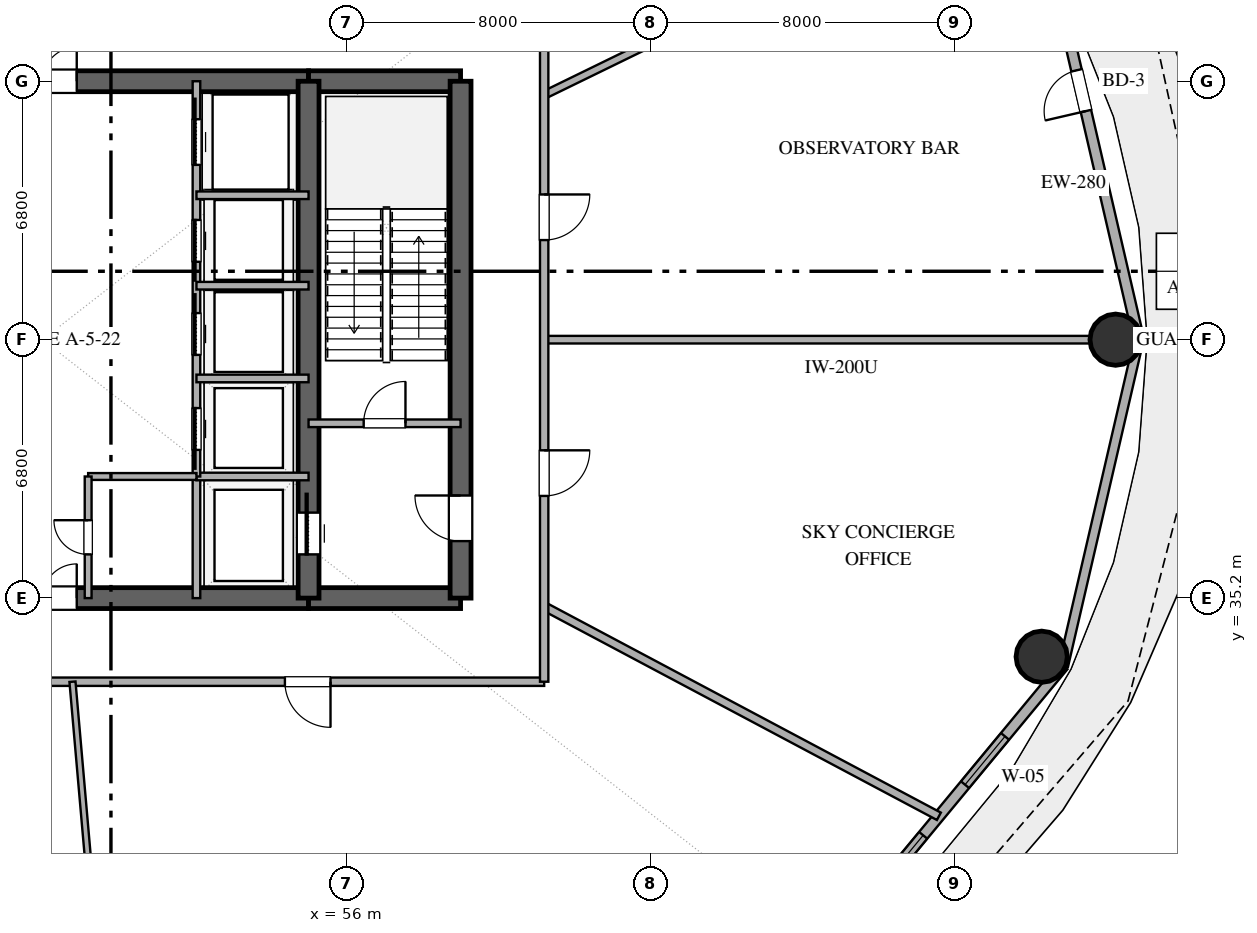
"""IFC4 building model, lengths in metres.
Left out: names, types, materials, properties, quantities, classifications, styles, units other than length and angle.
Written with IfcOpenShell. Run it as: python <this file> out.ifc"""

import sys

from ifc_helpers import new_model, si_unit, direction, frame, frame_2d, origin, origin_2d, place, context, subcontext, project, spatial, rectangle, hollow_circle, extrude, element, fill, save


model = new_model("IFC4")
c1 = context("Model", 3, precision=1e-05, world=origin(), true_north=direction((0.0, 1.0)))
c2 = subcontext(c1, "Body", "Model", "MODEL_VIEW")
j1 = project(units=[si_unit("LENGTHUNIT", "METRE"), si_unit("PLANEANGLEUNIT", "RADIAN")], contexts=[c1])
p1 = place(None, origin())
s1 = spatial("IfcSite", under=j1, at=p1, CompositionType="ELEMENT")
p2 = place(p1, origin())
s2 = spatial("IfcBuilding", under=s1, at=p2, CompositionType="ELEMENT")
p3 = place(p2, frame((0.0, 0.0, 134.4)))
s3 = spatial("IfcBuildingStorey", under=s2, at=p3, CompositionType="ELEMENT", Elevation=134.4)
p4 = place(p3, frame((41.0, 35.2, 0.0), z_axis=(0.0, 0.0, 1.0), x_axis=(1.0, 0.0, 0.0)))
e1 = element("IfcWall", 1, at=p4, inside=s3, PredefinedType="SHEAR", context=c2, shape_type="SweptSolid", body=[
    extrude(rectangle(XDim=14.0, YDim=0.55, at=frame_2d((7.0, 0.0))), origin(), (0.0, 0.0, 1.0), 5.05),
])
p5 = place(p4, frame((6.1, 0.0, 0.0)))
e2 = element("IfcOpeningElement", 2, at=p5, cuts=e1, PredefinedType="OPENING", context=c2, shape_type="SweptSolid", body=[
    extrude(rectangle(XDim=1.8, YDim=2.25, at=frame_2d((0.9, 1.125))), frame((0.0, 0.285, 0.0), z_axis=(0.0, -1.0, 0.0), x_axis=(1.0, 0.0, 0.0)), (0.0, 0.0, 1.0), 0.57),
])
p6 = place(p3, frame((55.0, 35.2, 0.0), z_axis=(0.0, 0.0, 1.0), x_axis=(1.0, 0.0, 0.0)))
e3 = element("IfcWall", 3, at=p6, inside=s3, PredefinedType="SHEAR", context=c2, shape_type="SweptSolid", body=[
    extrude(rectangle(XDim=4.0, YDim=0.55, at=frame_2d((2.0, 0.0))), origin(), (0.0, 0.0, 1.0), 5.05),
])
p7 = place(p3, frame((41.0, 48.8, 0.0), z_axis=(0.0, 0.0, 1.0), x_axis=(1.0, 0.0, 0.0)))
e4 = element("IfcWall", 4, at=p7, inside=s3, PredefinedType="SHEAR", context=c2, shape_type="SweptSolid", body=[
    extrude(rectangle(XDim=14.0, YDim=0.55, at=frame_2d((7.0, 0.0))), origin(), (0.0, 0.0, 1.0), 5.05),
])
p8 = place(p7, frame((6.1, 0.0, 0.0)))
e5 = element("IfcOpeningElement", 5, at=p8, cuts=e4, PredefinedType="OPENING", context=c2, shape_type="SweptSolid", body=[
    extrude(rectangle(XDim=1.8, YDim=2.25, at=frame_2d((0.9, 1.125))), frame((0.0, 0.285, 0.0), z_axis=(0.0, -1.0, 0.0), x_axis=(1.0, 0.0, 0.0)), (0.0, 0.0, 1.0), 0.57),
])
p9 = place(p3, frame((55.0, 48.8, 0.0), z_axis=(0.0, 0.0, 1.0), x_axis=(1.0, 0.0, 0.0)))
e6 = element("IfcWall", 6, at=p9, inside=s3, PredefinedType="SHEAR", context=c2, shape_type="SweptSolid", body=[
    extrude(rectangle(XDim=4.0, YDim=0.55, at=frame_2d((2.0, 0.0))), origin(), (0.0, 0.0, 1.0), 5.05),
])
p10 = place(p3, frame((59.0, 35.2, 0.0), z_axis=(0.0, 0.0, 1.0), x_axis=(0.0, 1.0, 0.0)))
e7 = element("IfcWall", 7, at=p10, inside=s3, PredefinedType="SHEAR", context=c2, shape_type="SweptSolid", body=[
    extrude(rectangle(XDim=13.6, YDim=0.55, at=frame_2d((6.8, 0.0))), origin(), (0.0, 0.0, 1.0), 5.05),
])
p11 = place(p10, frame((1.5, 0.0, 0.0)))
e8 = element("IfcOpeningElement", 8, at=p11, cuts=e7, PredefinedType="OPENING", context=c2, shape_type="SweptSolid", body=[
    extrude(rectangle(XDim=1.2, YDim=2.15, at=frame_2d((0.6, 1.075))), frame((0.0, 0.285, 0.0), z_axis=(0.0, -1.0, 0.0), x_axis=(1.0, 0.0, 0.0)), (0.0, 0.0, 1.0), 0.57),
])
p12 = place(p3, frame((55.0, 35.2, 0.0), z_axis=(0.0, 0.0, 1.0), x_axis=(0.0, 1.0, 0.0)))
e9 = element("IfcWall", 9, at=p12, inside=s3, PredefinedType="SHEAR", context=c2, shape_type="SweptSolid", body=[
    extrude(rectangle(XDim=13.6, YDim=0.55, at=frame_2d((6.8, 0.0))), origin(), (0.0, 0.0, 1.0), 5.05),
])
p13 = place(p12, frame((1.15, 0.0, 0.0)))
e10 = element("IfcOpeningElement", 10, at=p13, cuts=e9, PredefinedType="OPENING", context=c2, shape_type="SweptSolid", body=[
    extrude(rectangle(XDim=1.1, YDim=2.2, at=frame_2d((0.55, 1.1))), frame((0.0, 0.285, 0.0), z_axis=(0.0, -1.0, 0.0), x_axis=(1.0, 0.0, 0.0)), (0.0, 0.0, 1.0), 0.57),
])
for number, where, z_axis, x_axis in (
    (11, (76.237, 42.0, 0.0), (0.0, 0.0, 1.0), (1.0, 0.0, 0.0)),
    (12, (74.291, 33.657, 0.0), (0.0, 0.0, 1.0), (1.0, 0.0, 0.0)),
):
    element("IfcColumn", number, at=place(p3, frame(where, z_axis=z_axis, x_axis=x_axis)), inside=s3, PredefinedType="COLUMN", context=c2, shape_type="SweptSolid", body=[
        extrude(hollow_circle(Radius=0.675, WallThickness=0.036, at=origin_2d()), origin(), (0.0, 0.0, 1.0), 5.05),
    ])
p14 = place(p3, frame((76.849, 42.0, 0.0), z_axis=(0.0, 0.0, 1.0), x_axis=(-0.22558597182, 0.974223264616, 0.0)))
e13 = element("IfcWall", 13, at=p14, inside=s3, PredefinedType="SOLIDWALL", context=c2, shape_type="SweptSolid", body=[
    extrude(rectangle(XDim=8.811, YDim=0.28, at=frame_2d((4.405, 0.0))), origin(), (0.0, 0.0, 1.0), 5.05),
])
p15 = place(p14, frame((6.175, 0.0, 0.0)))
e14 = element("IfcOpeningElement", 14, at=p15, cuts=e13, PredefinedType="OPENING", context=c2, shape_type="SweptSolid", body=[
    extrude(rectangle(XDim=1.1, YDim=2.25, at=frame_2d((0.55, 1.125))), frame((0.0, 0.15, 0.0), z_axis=(0.0, -1.0, 0.0), x_axis=(1.0, 0.0, 0.0)), (0.0, 0.0, 1.0), 0.3),
])
p16 = place(p3, frame((68.84, 26.14, 0.0), z_axis=(0.0, 0.0, 1.0), x_axis=(0.637505817448, 0.770445541696, 0.0)))
e15 = element("IfcWall", 15, at=p16, inside=s3, PredefinedType="SOLIDWALL", context=c2, shape_type="SweptSolid", body=[
    extrude(rectangle(XDim=9.445, YDim=0.28, at=frame_2d((4.723, 0.0))), origin(), (0.0, 0.0, 1.0), 5.05),
])
p17 = place(p16, frame((1.86, 0.0, 0.85)))
e16 = element("IfcOpeningElement", 16, at=p17, cuts=e15, PredefinedType="OPENING", context=c2, shape_type="SweptSolid", body=[
    extrude(rectangle(XDim=1.8, YDim=2.2, at=frame_2d((0.9, 1.1))), frame((0.0, 0.15, 0.0), z_axis=(0.0, -1.0, 0.0), x_axis=(1.0, 0.0, 0.0)), (0.0, 0.0, 1.0), 0.3),
])
p18 = place(p16, frame((5.388, 0.0, 0.85)))
e17 = element("IfcOpeningElement", 17, at=p18, cuts=e15, PredefinedType="OPENING", context=c2, shape_type="SweptSolid", body=[
    extrude(rectangle(XDim=1.65, YDim=2.0, at=frame_2d((0.825, 1.0))), frame((0.0, 0.15, 0.0), z_axis=(0.0, -1.0, 0.0), x_axis=(1.0, 0.0, 0.0)), (0.0, 0.0, 1.0), 0.3),
])
p19 = place(p3, frame((74.861, 33.417, 0.0), z_axis=(0.0, 0.0, 1.0), x_axis=(0.22558597182, 0.974223264616, 0.0)))
e18 = element("IfcWall", 18, at=p19, inside=s3, PredefinedType="SOLIDWALL", context=c2, shape_type="SweptSolid", body=[
    extrude(rectangle(XDim=8.811, YDim=0.25, at=frame_2d((4.405, 0.0))), origin(), (0.0, 0.0, 1.0), 5.05),
])
p20 = place(p3, frame((55.0, 39.8, 0.0), z_axis=(0.0, 0.0, 1.0), x_axis=(1.0, 0.0, 0.0)))
e19 = element("IfcWall", 19, at=p20, inside=s3, PredefinedType="SOLIDWALL", context=c2, shape_type="SweptSolid", body=[
    extrude(rectangle(XDim=4.0, YDim=0.2, at=frame_2d((2.0, 0.0))), origin(), (0.0, 0.0, 1.0), 4.35),
])
p21 = place(p20, frame((1.45, 0.0, 0.0)))
e20 = element("IfcOpeningElement", 20, at=p21, cuts=e19, PredefinedType="OPENING", context=c2, shape_type="SweptSolid", body=[
    extrude(rectangle(XDim=1.1, YDim=2.15, at=frame_2d((0.55, 1.075))), frame((0.0, 0.11, 0.0), z_axis=(0.0, -1.0, 0.0), x_axis=(1.0, 0.0, 0.0)), (0.0, 0.0, 1.0), 0.22),
])
p22 = place(p3, frame((52.05, 35.2, 0.0), z_axis=(0.0, 0.0, 1.0), x_axis=(0.0, 1.0, 0.0)))
e21 = element("IfcWall", 21, at=p22, inside=s3, PredefinedType="SOLIDWALL", context=c2, shape_type="SweptSolid", body=[
    extrude(rectangle(XDim=3.2, YDim=0.2, at=frame_2d((1.6, 0.0))), origin(), (0.0, 0.0, 1.0), 4.35),
])
p23 = place(p3, frame((52.05, 38.4, 0.0), z_axis=(0.0, 0.0, 1.0), x_axis=(1.0, 0.0, 0.0)))
e22 = element("IfcWall", 22, at=p23, inside=s3, PredefinedType="SOLIDWALL", context=c2, shape_type="SweptSolid", body=[
    extrude(rectangle(XDim=2.95, YDim=0.2, at=frame_2d((1.475, 0.0))), origin(), (0.0, 0.0, 1.0), 4.35),
])
p24 = place(p3, frame((52.05, 38.4, 0.0), z_axis=(0.0, 0.0, 1.0), x_axis=(0.0, 1.0, 0.0)))
e23 = element("IfcWall", 23, at=p24, inside=s3, PredefinedType="SOLIDWALL", context=c2, shape_type="SweptSolid", body=[
    extrude(rectangle(XDim=10.4, YDim=0.2, at=frame_2d((5.2, 0.0))), origin(), (0.0, 0.0, 1.0), 4.35),
])
p25 = place(p24, frame((0.7, 0.0, 0.0)))
e24 = element("IfcOpeningElement", 24, at=p25, cuts=e23, PredefinedType="OPENING", context=c2, shape_type="SweptSolid", body=[
    extrude(rectangle(XDim=1.1, YDim=2.2, at=frame_2d((0.55, 1.1))), frame((0.0, 0.11, 0.0), z_axis=(0.0, -1.0, 0.0), x_axis=(1.0, 0.0, 0.0)), (0.0, 0.0, 1.0), 0.22),
])
p26 = place(p24, frame((3.2, 0.0, 0.0)))
e25 = element("IfcOpeningElement", 25, at=p26, cuts=e23, PredefinedType="OPENING", context=c2, shape_type="SweptSolid", body=[
    extrude(rectangle(XDim=1.1, YDim=2.2, at=frame_2d((0.55, 1.1))), frame((0.0, 0.11, 0.0), z_axis=(0.0, -1.0, 0.0), x_axis=(1.0, 0.0, 0.0)), (0.0, 0.0, 1.0), 0.22),
])
p27 = place(p24, frame((5.65, 0.0, 0.0)))
e26 = element("IfcOpeningElement", 26, at=p27, cuts=e23, PredefinedType="OPENING", context=c2, shape_type="SweptSolid", body=[
    extrude(rectangle(XDim=1.1, YDim=2.2, at=frame_2d((0.55, 1.1))), frame((0.0, 0.11, 0.0), z_axis=(0.0, -1.0, 0.0), x_axis=(1.0, 0.0, 0.0)), (0.0, 0.0, 1.0), 0.22),
])
p28 = place(p24, frame((8.2, 0.0, 0.0)))
e27 = element("IfcOpeningElement", 27, at=p28, cuts=e23, PredefinedType="OPENING", context=c2, shape_type="SweptSolid", body=[
    extrude(rectangle(XDim=1.2, YDim=2.2, at=frame_2d((0.6, 1.1))), frame((0.0, 0.11, 0.0), z_axis=(0.0, -1.0, 0.0), x_axis=(1.0, 0.0, 0.0)), (0.0, 0.0, 1.0), 0.22),
])
for number, where, z_axis, x_axis in (
    (28, (52.05, 40.98, 0.0), (0.0, 0.0, 1.0), (1.0, 0.0, 0.0)),
    (29, (52.05, 43.42, 0.0), (0.0, 0.0, 1.0), (1.0, 0.0, 0.0)),
    (30, (52.05, 45.8, 0.0), (0.0, 0.0, 1.0), (1.0, 0.0, 0.0)),
):
    element("IfcWall", number, at=place(p3, frame(where, z_axis=z_axis, x_axis=x_axis)), inside=s3, PredefinedType="SOLIDWALL", context=c2, shape_type="SweptSolid", body=[
        extrude(rectangle(XDim=2.95, YDim=0.2, at=frame_2d((1.475, 0.0))), origin(), (0.0, 0.0, 1.0), 4.35),
    ])
p29 = place(p3, frame((49.2, 38.4, 0.0), z_axis=(0.0, 0.0, 1.0), x_axis=(1.0, 0.0, 0.0)))
e31 = element("IfcWall", 31, at=p29, inside=s3, PredefinedType="PLUMBINGWALL", context=c2, shape_type="SweptSolid", body=[
    extrude(rectangle(XDim=2.85, YDim=0.18, at=frame_2d((1.425, 0.0))), origin(), (0.0, 0.0, 1.0), 4.35),
])
p30 = place(p3, frame((49.2, 35.2, 0.0), z_axis=(0.0, 0.0, 1.0), x_axis=(0.0, 1.0, 0.0)))
e32 = element("IfcWall", 32, at=p30, inside=s3, PredefinedType="PLUMBINGWALL", context=c2, shape_type="SweptSolid", body=[
    extrude(rectangle(XDim=3.2, YDim=0.18, at=frame_2d((1.6, 0.0))), origin(), (0.0, 0.0, 1.0), 4.35),
])
p31 = place(p30, frame((1.15, 0.0, 0.0)))
e33 = element("IfcOpeningElement", 33, at=p31, cuts=e32, PredefinedType="OPENING", context=c2, shape_type="SweptSolid", body=[
    extrude(rectangle(XDim=0.9, YDim=2.1, at=frame_2d((0.45, 1.05))), frame((0.0, 0.1, 0.0), z_axis=(0.0, -1.0, 0.0), x_axis=(1.0, 0.0, 0.0)), (0.0, 0.0, 1.0), 0.2),
])
p32 = place(p3, frame((76.849, 42.0, 0.0), z_axis=(0.0, 0.0, 1.0), x_axis=(-1.0, 0.0, 0.0)))
e34 = element("IfcWall", 34, at=p32, inside=s3, PredefinedType="PARTITIONING", context=c2, shape_type="SweptSolid", body=[
    extrude(rectangle(XDim=15.649, YDim=0.2, at=frame_2d((7.825, 0.0))), origin(), (0.0, 0.0, 1.0), 4.35),
])
p33 = place(p3, frame((61.2, 33.0, 0.0), z_axis=(0.0, 0.0, 1.0), x_axis=(-1.0, 0.0, 0.0)))
e35 = element("IfcWall", 35, at=p33, inside=s3, PredefinedType="SOLIDWALL", context=c2, shape_type="SweptSolid", body=[
    extrude(rectangle(XDim=26.4, YDim=0.22, at=frame_2d((13.2, 0.0))), origin(), (0.0, 0.0, 1.0), 4.35),
])
p34 = place(p33, frame((18.645, 0.0, 0.0)))
e36 = element("IfcOpeningElement", 36, at=p34, cuts=e35, PredefinedType="OPENING", context=c2, shape_type="SweptSolid", body=[
    extrude(rectangle(XDim=1.2, YDim=2.25, at=frame_2d((0.6, 1.125))), frame((0.0, 0.12, 0.0), z_axis=(0.0, -1.0, 0.0), x_axis=(1.0, 0.0, 0.0)), (0.0, 0.0, 1.0), 0.24),
])
p35 = place(p33, frame((5.622, 0.0, 0.0)))
e37 = element("IfcOpeningElement", 37, at=p35, cuts=e35, PredefinedType="OPENING", context=c2, shape_type="SweptSolid", body=[
    extrude(rectangle(XDim=1.2, YDim=2.25, at=frame_2d((0.6, 1.125))), frame((0.0, 0.12, 0.0), z_axis=(0.0, -1.0, 0.0), x_axis=(1.0, 0.0, 0.0)), (0.0, 0.0, 1.0), 0.24),
])
p36 = place(p3, frame((49.937, 19.861, 0.0), z_axis=(0.0, 0.0, 1.0), x_axis=(-0.087168787326, 0.996193556753, 0.0)))
e38 = element("IfcWall", 38, at=p36, inside=s3, PredefinedType="PLUMBINGWALL", context=c2, shape_type="SweptSolid", body=[
    extrude(rectangle(XDim=13.189, YDim=0.16, at=frame_2d((6.594, 0.0))), origin(), (0.0, 0.0, 1.0), 4.35),
])
p37 = place(p3, frame((72.198, 53.802, 0.0), z_axis=(0.0, 0.0, 1.0), x_axis=(-0.898789153873, -0.438381177608, 0.0)))
e39 = element("IfcWall", 39, at=p37, inside=s3, PredefinedType="PARTITIONING", context=c2, shape_type="SweptSolid", body=[
    extrude(rectangle(XDim=12.237, YDim=0.2, at=frame_2d((6.118, 0.0))), origin(), (0.0, 0.0, 1.0), 4.35),
])
p38 = place(p3, frame((61.2, 34.981, 0.0), z_axis=(0.0, 0.0, 1.0), x_axis=(0.88294798911, -0.469470817545, 0.0)))
e40 = element("IfcWall", 40, at=p38, inside=s3, PredefinedType="SOLIDWALL", context=c2, shape_type="SweptSolid", body=[
    extrude(rectangle(XDim=11.764, YDim=0.22, at=frame_2d((5.882, 0.0))), origin(), (0.0, 0.0, 1.0), 4.35),
])
p39 = place(p3, frame((61.2, 51.0, 0.0), z_axis=(0.0, 0.0, 1.0), x_axis=(0.0, -1.0, 0.0)))
e41 = element("IfcWall", 41, at=p39, inside=s3, PredefinedType="SOLIDWALL", context=c2, shape_type="SweptSolid", body=[
    extrude(rectangle(XDim=18.0, YDim=0.22, at=frame_2d((9.0, 0.0))), origin(), (0.0, 0.0, 1.0), 4.35),
])
p40 = place(p39, frame((11.911, 0.0, 0.0)))
e42 = element("IfcOpeningElement", 42, at=p40, cuts=e41, PredefinedType="OPENING", context=c2, shape_type="SweptSolid", body=[
    extrude(rectangle(XDim=1.2, YDim=2.25, at=frame_2d((0.6, 1.125))), frame((0.0, 0.12, 0.0), z_axis=(0.0, -1.0, 0.0), x_axis=(1.0, 0.0, 0.0)), (0.0, 0.0, 1.0), 0.24),
])
p41 = place(p39, frame((5.179, 0.0, 0.0)))
e43 = element("IfcOpeningElement", 43, at=p41, cuts=e41, PredefinedType="OPENING", context=c2, shape_type="SweptSolid", body=[
    extrude(rectangle(XDim=1.2, YDim=2.25, at=frame_2d((0.6, 1.125))), frame((0.0, 0.12, 0.0), z_axis=(0.0, -1.0, 0.0), x_axis=(1.0, 0.0, 0.0)), (0.0, 0.0, 1.0), 0.24),
])
p42 = place(p15, origin())
e44 = element("IfcDoor", 44, at=p42, inside=s3, OperationType="SINGLE_SWING_LEFT", PredefinedType="DOOR", context=c2, shape_type="SweptSolid", body=[
    extrude(rectangle(XDim=1.1, YDim=2.25, at=frame_2d((0.55, 1.125))), frame((0.0, 0.025, 0.0), z_axis=(0.0, -1.0, 0.0), x_axis=(1.0, 0.0, 0.0)), (0.0, 0.0, 1.0), 0.05),
])
fill(e14, e44)
p43 = place(p17, origin())
e45 = element("IfcWindow", 45, at=p43, inside=s3, PartitioningType="SINGLE_PANEL", PredefinedType="WINDOW", context=c2, shape_type="SweptSolid", body=[
    extrude(rectangle(XDim=1.8, YDim=2.2, at=frame_2d((0.9, 1.1))), frame((0.0, 0.03, 0.0), z_axis=(0.0, -1.0, 0.0), x_axis=(1.0, 0.0, 0.0)), (0.0, 0.0, 1.0), 0.06),
])
fill(e16, e45)
p44 = place(p18, origin())
e46 = element("IfcWindow", 46, at=p44, inside=s3, PartitioningType="SINGLE_PANEL", PredefinedType="WINDOW", context=c2, shape_type="SweptSolid", body=[
    extrude(rectangle(XDim=1.65, YDim=2.0, at=frame_2d((0.825, 1.0))), frame((0.0, 0.03, 0.0), z_axis=(0.0, -1.0, 0.0), x_axis=(1.0, 0.0, 0.0)), (0.0, 0.0, 1.0), 0.06),
])
fill(e17, e46)
p45 = place(p13, origin())
e47 = element("IfcDoor", 47, at=p45, inside=s3, OperationType="SLIDING_TO_RIGHT", PredefinedType="DOOR", context=c2, shape_type="SweptSolid", body=[
    extrude(rectangle(XDim=1.1, YDim=2.2, at=frame_2d((0.55, 1.1))), frame((0.0, 0.025, 0.0), z_axis=(0.0, -1.0, 0.0), x_axis=(1.0, 0.0, 0.0)), (0.0, 0.0, 1.0), 0.05),
])
fill(e10, e47)
p46 = place(p11, origin())
e48 = element("IfcDoor", 48, at=p46, inside=s3, OperationType="SINGLE_SWING_RIGHT", PredefinedType="DOOR", context=c2, shape_type="SweptSolid", body=[
    extrude(rectangle(XDim=1.2, YDim=2.15, at=frame_2d((0.6, 1.075))), frame((0.0, 0.025, 0.0), z_axis=(0.0, -1.0, 0.0), x_axis=(1.0, 0.0, 0.0)), (0.0, 0.0, 1.0), 0.05),
])
fill(e8, e48)
p47 = place(p5, origin())
e49 = element("IfcDoor", 49, at=p47, inside=s3, OperationType="DOUBLE_DOOR_SINGLE_SWING", PredefinedType="DOOR", context=c2, shape_type="SweptSolid", body=[
    extrude(rectangle(XDim=1.8, YDim=2.25, at=frame_2d((0.9, 1.125))), frame((0.0, 0.025, 0.0), z_axis=(0.0, -1.0, 0.0), x_axis=(1.0, 0.0, 0.0)), (0.0, 0.0, 1.0), 0.05),
])
fill(e2, e49)
p48 = place(p8, origin())
e50 = element("IfcDoor", 50, at=p48, inside=s3, OperationType="DOUBLE_DOOR_SINGLE_SWING", PredefinedType="DOOR", context=c2, shape_type="SweptSolid", body=[
    extrude(rectangle(XDim=1.8, YDim=2.25, at=frame_2d((0.9, 1.125))), frame((0.0, 0.025, 0.0), z_axis=(0.0, -1.0, 0.0), x_axis=(1.0, 0.0, 0.0)), (0.0, 0.0, 1.0), 0.05),
])
fill(e5, e50)
p49 = place(p21, origin())
e51 = element("IfcDoor", 51, at=p49, inside=s3, OperationType="SINGLE_SWING_RIGHT", PredefinedType="DOOR", context=c2, shape_type="SweptSolid", body=[
    extrude(rectangle(XDim=1.1, YDim=2.15, at=frame_2d((0.55, 1.075))), frame((0.0, 0.025, 0.0), z_axis=(0.0, -1.0, 0.0), x_axis=(1.0, 0.0, 0.0)), (0.0, 0.0, 1.0), 0.05),
])
fill(e20, e51)
p50 = place(p25, origin())
e52 = element("IfcDoor", 52, at=p50, inside=s3, OperationType="SLIDING_TO_LEFT", PredefinedType="DOOR", context=c2, shape_type="SweptSolid", body=[
    extrude(rectangle(XDim=1.1, YDim=2.2, at=frame_2d((0.55, 1.1))), frame((0.0, 0.025, 0.0), z_axis=(0.0, -1.0, 0.0), x_axis=(1.0, 0.0, 0.0)), (0.0, 0.0, 1.0), 0.05),
])
fill(e24, e52)
p51 = place(p26, origin())
e53 = element("IfcDoor", 53, at=p51, inside=s3, OperationType="SLIDING_TO_RIGHT", PredefinedType="DOOR", context=c2, shape_type="SweptSolid", body=[
    extrude(rectangle(XDim=1.1, YDim=2.2, at=frame_2d((0.55, 1.1))), frame((0.0, 0.025, 0.0), z_axis=(0.0, -1.0, 0.0), x_axis=(1.0, 0.0, 0.0)), (0.0, 0.0, 1.0), 0.05),
])
fill(e25, e53)
p52 = place(p27, origin())
e54 = element("IfcDoor", 54, at=p52, inside=s3, OperationType="SLIDING_TO_LEFT", PredefinedType="DOOR", context=c2, shape_type="SweptSolid", body=[
    extrude(rectangle(XDim=1.1, YDim=2.2, at=frame_2d((0.55, 1.1))), frame((0.0, 0.025, 0.0), z_axis=(0.0, -1.0, 0.0), x_axis=(1.0, 0.0, 0.0)), (0.0, 0.0, 1.0), 0.05),
])
fill(e26, e54)
p53 = place(p28, origin())
e55 = element("IfcDoor", 55, at=p53, inside=s3, OperationType="SLIDING_TO_RIGHT", PredefinedType="DOOR", context=c2, shape_type="SweptSolid", body=[
    extrude(rectangle(XDim=1.2, YDim=2.2, at=frame_2d((0.6, 1.1))), frame((0.0, 0.025, 0.0), z_axis=(0.0, -1.0, 0.0), x_axis=(1.0, 0.0, 0.0)), (0.0, 0.0, 1.0), 0.05),
])
fill(e27, e55)
p54 = place(p31, origin())
e56 = element("IfcDoor", 56, at=p54, inside=s3, OperationType="SINGLE_SWING_RIGHT", PredefinedType="DOOR", context=c2, shape_type="SweptSolid", body=[
    extrude(rectangle(XDim=0.9, YDim=2.1, at=frame_2d((0.45, 1.05))), frame((0.0, 0.025, 0.0), z_axis=(0.0, -1.0, 0.0), x_axis=(1.0, 0.0, 0.0)), (0.0, 0.0, 1.0), 0.05),
])
fill(e33, e56)
p55 = place(p35, origin())
e57 = element("IfcDoor", 57, at=p55, inside=s3, OperationType="SINGLE_SWING_LEFT", PredefinedType="DOOR", context=c2, shape_type="SweptSolid", body=[
    extrude(rectangle(XDim=1.2, YDim=2.25, at=frame_2d((0.6, 1.125))), frame((0.0, 0.025, 0.0), z_axis=(0.0, -1.0, 0.0), x_axis=(1.0, 0.0, 0.0)), (0.0, 0.0, 1.0), 0.05),
])
fill(e37, e57)
p56 = place(p40, origin())
e58 = element("IfcDoor", 58, at=p56, inside=s3, OperationType="SINGLE_SWING_LEFT", PredefinedType="DOOR", context=c2, shape_type="SweptSolid", body=[
    extrude(rectangle(XDim=1.2, YDim=2.25, at=frame_2d((0.6, 1.125))), frame((0.0, 0.025, 0.0), z_axis=(0.0, -1.0, 0.0), x_axis=(1.0, 0.0, 0.0)), (0.0, 0.0, 1.0), 0.05),
])
fill(e42, e58)
p57 = place(p41, origin())
e59 = element("IfcDoor", 59, at=p57, inside=s3, OperationType="SINGLE_SWING_LEFT", PredefinedType="DOOR", context=c2, shape_type="SweptSolid", body=[
    extrude(rectangle(XDim=1.2, YDim=2.25, at=frame_2d((0.6, 1.125))), frame((0.0, 0.025, 0.0), z_axis=(0.0, -1.0, 0.0), x_axis=(1.0, 0.0, 0.0)), (0.0, 0.0, 1.0), 0.05),
])
fill(e43, e59)
save(model, sys.argv[1])
